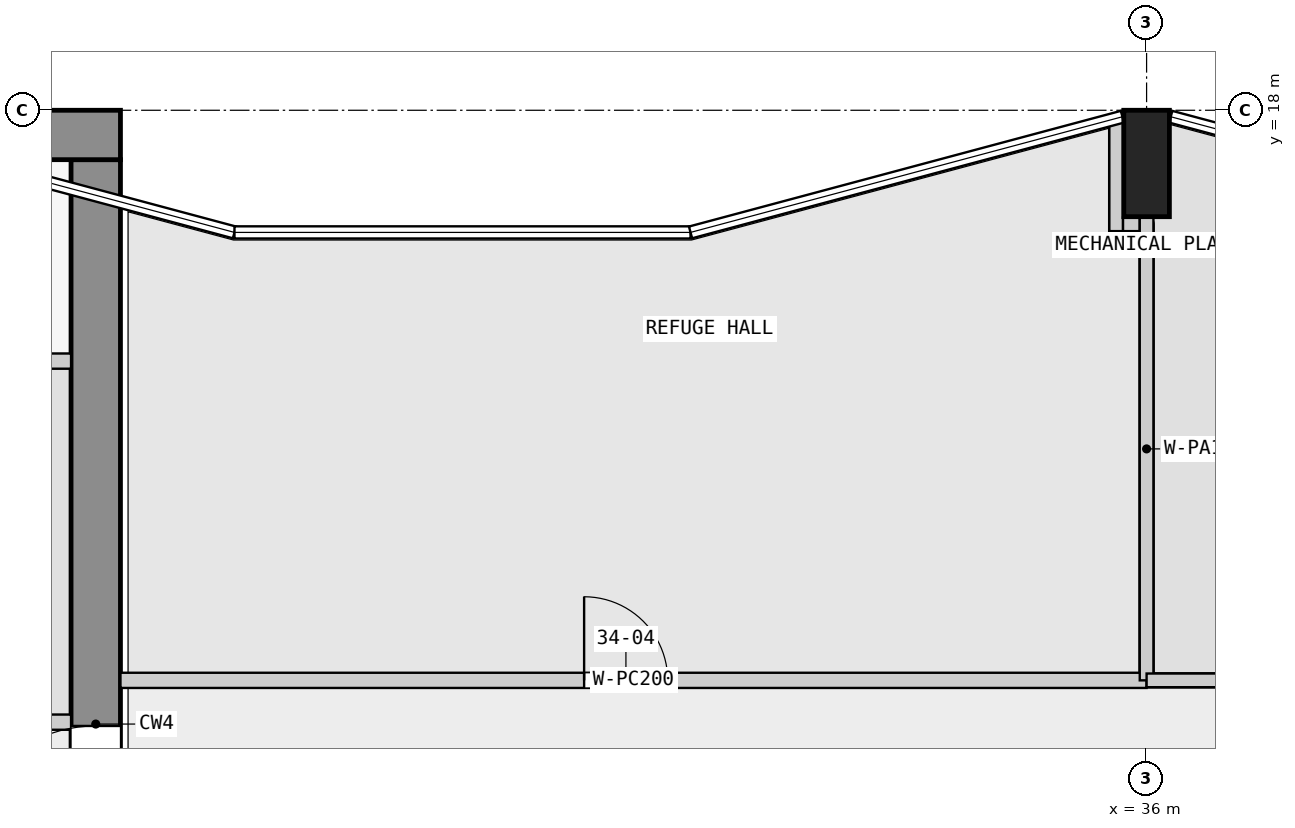
"""IFC4 building model, lengths in metres.
Left out: names, types, materials, properties, quantities, classifications, styles, units other than length and angle.
Written with IfcOpenShell. Run it as: python <this file> out.ifc"""

import sys

from ifc_helpers import new_model, si_unit, direction, frame, frame_2d, origin, origin_2d, place, context, subcontext, project, spatial, rectangle, extrude, element, fill, save


model = new_model("IFC4")
c1 = context("Model", 3, precision=1e-05, world=origin(), true_north=direction((0.0, 1.0)))
c2 = subcontext(c1, "Body", "Model", "MODEL_VIEW")
j1 = project(units=[si_unit("LENGTHUNIT", "METRE"), si_unit("PLANEANGLEUNIT", "RADIAN")], contexts=[c1])
p1 = place(None, origin())
s1 = spatial("IfcSite", under=j1, at=p1, CompositionType="ELEMENT")
p2 = place(p1, origin())
s2 = spatial("IfcBuilding", under=s1, at=p2, CompositionType="ELEMENT")
p3 = place(p2, frame((0.0, 0.0, 134.6)))
s3 = spatial("IfcBuildingStorey", under=s2, at=p3, CompositionType="ELEMENT", Elevation=134.6)
p4 = place(p3, frame((36.0, 17.3, 0.0), z_axis=(0.0, 0.0, 1.0), x_axis=(1.0, 0.0, 0.0)))
e1 = element("IfcColumn", 1, at=p4, inside=s3, PredefinedType="COLUMN", context=c2, shape_type="SweptSolid", body=[
    extrude(rectangle(XDim=0.6, YDim=1.4, at=origin_2d()), origin(), (0.0, 0.0, 1.0), 4.8),
])
p5 = place(p3, frame((1.65, 17.675, 0.0), z_axis=(0.0, 0.0, 1.0), x_axis=(1.0, 0.0, 0.0)))
e2 = element("IfcWall", 2, at=p5, inside=s3, PredefinedType="SHEAR", context=c2, shape_type="SweptSolid", body=[
    extrude(rectangle(XDim=20.85, YDim=0.65, at=frame_2d((10.425, 0.0))), origin(), (0.0, 0.0, 1.0), 4.3),
])
p6 = place(p3, frame((22.175, 2.5, 0.0), z_axis=(0.0, 0.0, 1.0), x_axis=(0.0, 1.0, 0.0)))
e3 = element("IfcWall", 3, at=p6, inside=s3, PredefinedType="SHEAR", context=c2, shape_type="SweptSolid", body=[
    extrude(rectangle(XDim=14.85, YDim=0.65, at=frame_2d((7.425, 0.0))), origin(), (0.0, 0.0, 1.0), 4.3),
])
p7 = place(p6, frame((5.6, 0.0, 0.0)))
e4 = element("IfcOpeningElement", 4, at=p7, cuts=e3, PredefinedType="OPENING", context=c2, shape_type="SweptSolid", body=[
    extrude(rectangle(XDim=1.8, YDim=2.1, at=frame_2d((0.9, 1.05))), frame((0.0, 0.335, 0.0), z_axis=(0.0, -1.0, 0.0), x_axis=(1.0, 0.0, 0.0)), (0.0, 0.0, 1.0), 0.67),
])
p8 = place(p3, frame((7.1, 9.95, 0.0), z_axis=(0.0, 0.0, 1.0), x_axis=(1.0, 0.0, 0.0)))
e5 = element("IfcWall", 5, at=p8, inside=s3, PredefinedType="PARTITIONING", context=c2, shape_type="SweptSolid", body=[
    extrude(rectangle(XDim=14.75, YDim=0.2, at=frame_2d((7.375, 0.0))), origin(), (0.0, 0.0, 1.0), 4.3),
])
p9 = place(p8, frame((6.35, 0.0, 0.0)))
e6 = element("IfcOpeningElement", 6, at=p9, cuts=e5, PredefinedType="OPENING", context=c2, shape_type="SweptSolid", body=[
    extrude(rectangle(XDim=1.1, YDim=2.1, at=frame_2d((0.55, 1.05))), frame((0.0, 0.11, 0.0), z_axis=(0.0, -1.0, 0.0), x_axis=(1.0, 0.0, 0.0)), (0.0, 0.0, 1.0), 0.22),
])
p10 = place(p3, frame((18.6, 14.7, 0.0), z_axis=(0.0, 0.0, 1.0), x_axis=(1.0, 0.0, 0.0)))
e7 = element("IfcWall", 7, at=p10, inside=s3, PredefinedType="PARTITIONING", context=c2, shape_type="SweptSolid", body=[
    extrude(rectangle(XDim=3.25, YDim=0.2, at=frame_2d((1.625, 0.0))), origin(), (0.0, 0.0, 1.0), 4.3),
])
p11 = place(p10, frame((0.3, 0.0, 0.0)))
e8 = element("IfcOpeningElement", 8, at=p11, cuts=e7, PredefinedType="OPENING", context=c2, shape_type="SweptSolid", body=[
    extrude(rectangle(XDim=0.9, YDim=2.1, at=frame_2d((0.45, 1.05))), frame((0.0, 0.11, 0.0), z_axis=(0.0, -1.0, 0.0), x_axis=(1.0, 0.0, 0.0)), (0.0, 0.0, 1.0), 0.22),
])
p12 = place(p10, frame((1.925, 0.0, 0.0)))
e9 = element("IfcOpeningElement", 9, at=p12, cuts=e7, PredefinedType="OPENING", context=c2, shape_type="SweptSolid", body=[
    extrude(rectangle(XDim=0.9, YDim=2.1, at=frame_2d((0.45, 1.05))), frame((0.0, 0.11, 0.0), z_axis=(0.0, -1.0, 0.0), x_axis=(1.0, 0.0, 0.0)), (0.0, 0.0, 1.0), 0.22),
])
p13 = place(p3, frame((22.5, 10.5, 0.0), z_axis=(0.0, 0.0, 1.0), x_axis=(1.0, 0.0, 0.0)))
e10 = element("IfcWall", 10, at=p13, inside=s3, PredefinedType="PARTITIONING", context=c2, shape_type="SweptSolid", body=[
    extrude(rectangle(XDim=13.5, YDim=0.2, at=frame_2d((6.75, 0.0))), origin(), (0.0, 0.0, 1.0), 4.3),
])
p14 = place(p13, frame((6.1, 0.0, 0.0)))
e11 = element("IfcOpeningElement", 11, at=p14, cuts=e10, PredefinedType="OPENING", context=c2, shape_type="SweptSolid", body=[
    extrude(rectangle(XDim=1.1, YDim=2.1, at=frame_2d((0.55, 1.05))), frame((0.0, 0.11, 0.0), z_axis=(0.0, -1.0, 0.0), x_axis=(1.0, 0.0, 0.0)), (0.0, 0.0, 1.0), 0.22),
])
p15 = place(p3, frame((35.6, 17.893, 0.0), z_axis=(0.0, 0.0, 1.0), x_axis=(0.0, -1.0, 0.0)))
e12 = element("IfcWall", 12, at=p15, inside=s3, PredefinedType="PARTITIONING", context=c2, shape_type="SweptSolid", body=[
    extrude(rectangle(XDim=1.483, YDim=0.18, at=frame_2d((0.742, 0.0))), origin(), (0.0, 0.0, 1.0), 4.3),
])
p16 = place(p3, frame((35.69, 16.5, 0.0), z_axis=(0.0, 0.0, 1.0), x_axis=(1.0, 0.0, 0.0)))
e13 = element("IfcWall", 13, at=p16, inside=s3, PredefinedType="PARTITIONING", context=c2, shape_type="SweptSolid", body=[
    extrude(rectangle(XDim=0.22, YDim=0.18, at=frame_2d((0.11, 0.0))), origin(), (0.0, 0.0, 1.0), 4.3),
])
p17 = place(p3, frame((36.0, 16.59, 0.0), z_axis=(0.0, 0.0, 1.0), x_axis=(0.0, -1.0, 0.0)))
e14 = element("IfcWall", 14, at=p17, inside=s3, PredefinedType="PARTITIONING", context=c2, shape_type="SweptSolid", body=[
    extrude(rectangle(XDim=6.09, YDim=0.18, at=frame_2d((3.045, 0.0))), origin(), (0.0, 0.0, 1.0), 4.3),
])
p18 = place(p3, frame((36.0, 10.5, 0.0), z_axis=(0.0, 0.0, 1.0), x_axis=(1.0, 0.0, 0.0)))
e15 = element("IfcWall", 15, at=p18, inside=s3, PredefinedType="PARTITIONING", context=c2, shape_type="SweptSolid", body=[
    extrude(rectangle(XDim=4.5, YDim=0.18, at=frame_2d((2.25, 0.0))), origin(), (0.0, 0.0, 1.0), 4.3),
])
p19 = place(p7, origin())
e16 = element("IfcDoor", 16, at=p19, inside=s3, OperationType="DOUBLE_DOOR_SINGLE_SWING", PredefinedType="DOOR", context=c2, shape_type="SweptSolid", body=[
    extrude(rectangle(XDim=1.8, YDim=2.1, at=frame_2d((0.9, 1.05))), frame((0.0, 0.025, 0.0), z_axis=(0.0, -1.0, 0.0), x_axis=(1.0, 0.0, 0.0)), (0.0, 0.0, 1.0), 0.05),
])
fill(e4, e16)
p20 = place(p14, origin())
e17 = element("IfcDoor", 17, at=p20, inside=s3, OperationType="SINGLE_SWING_LEFT", PredefinedType="DOOR", context=c2, shape_type="SweptSolid", body=[
    extrude(rectangle(XDim=1.1, YDim=2.1, at=frame_2d((0.55, 1.05))), frame((0.0, 0.025, 0.0), z_axis=(0.0, -1.0, 0.0), x_axis=(1.0, 0.0, 0.0)), (0.0, 0.0, 1.0), 0.05),
])
fill(e11, e17)
save(model, sys.argv[1])
